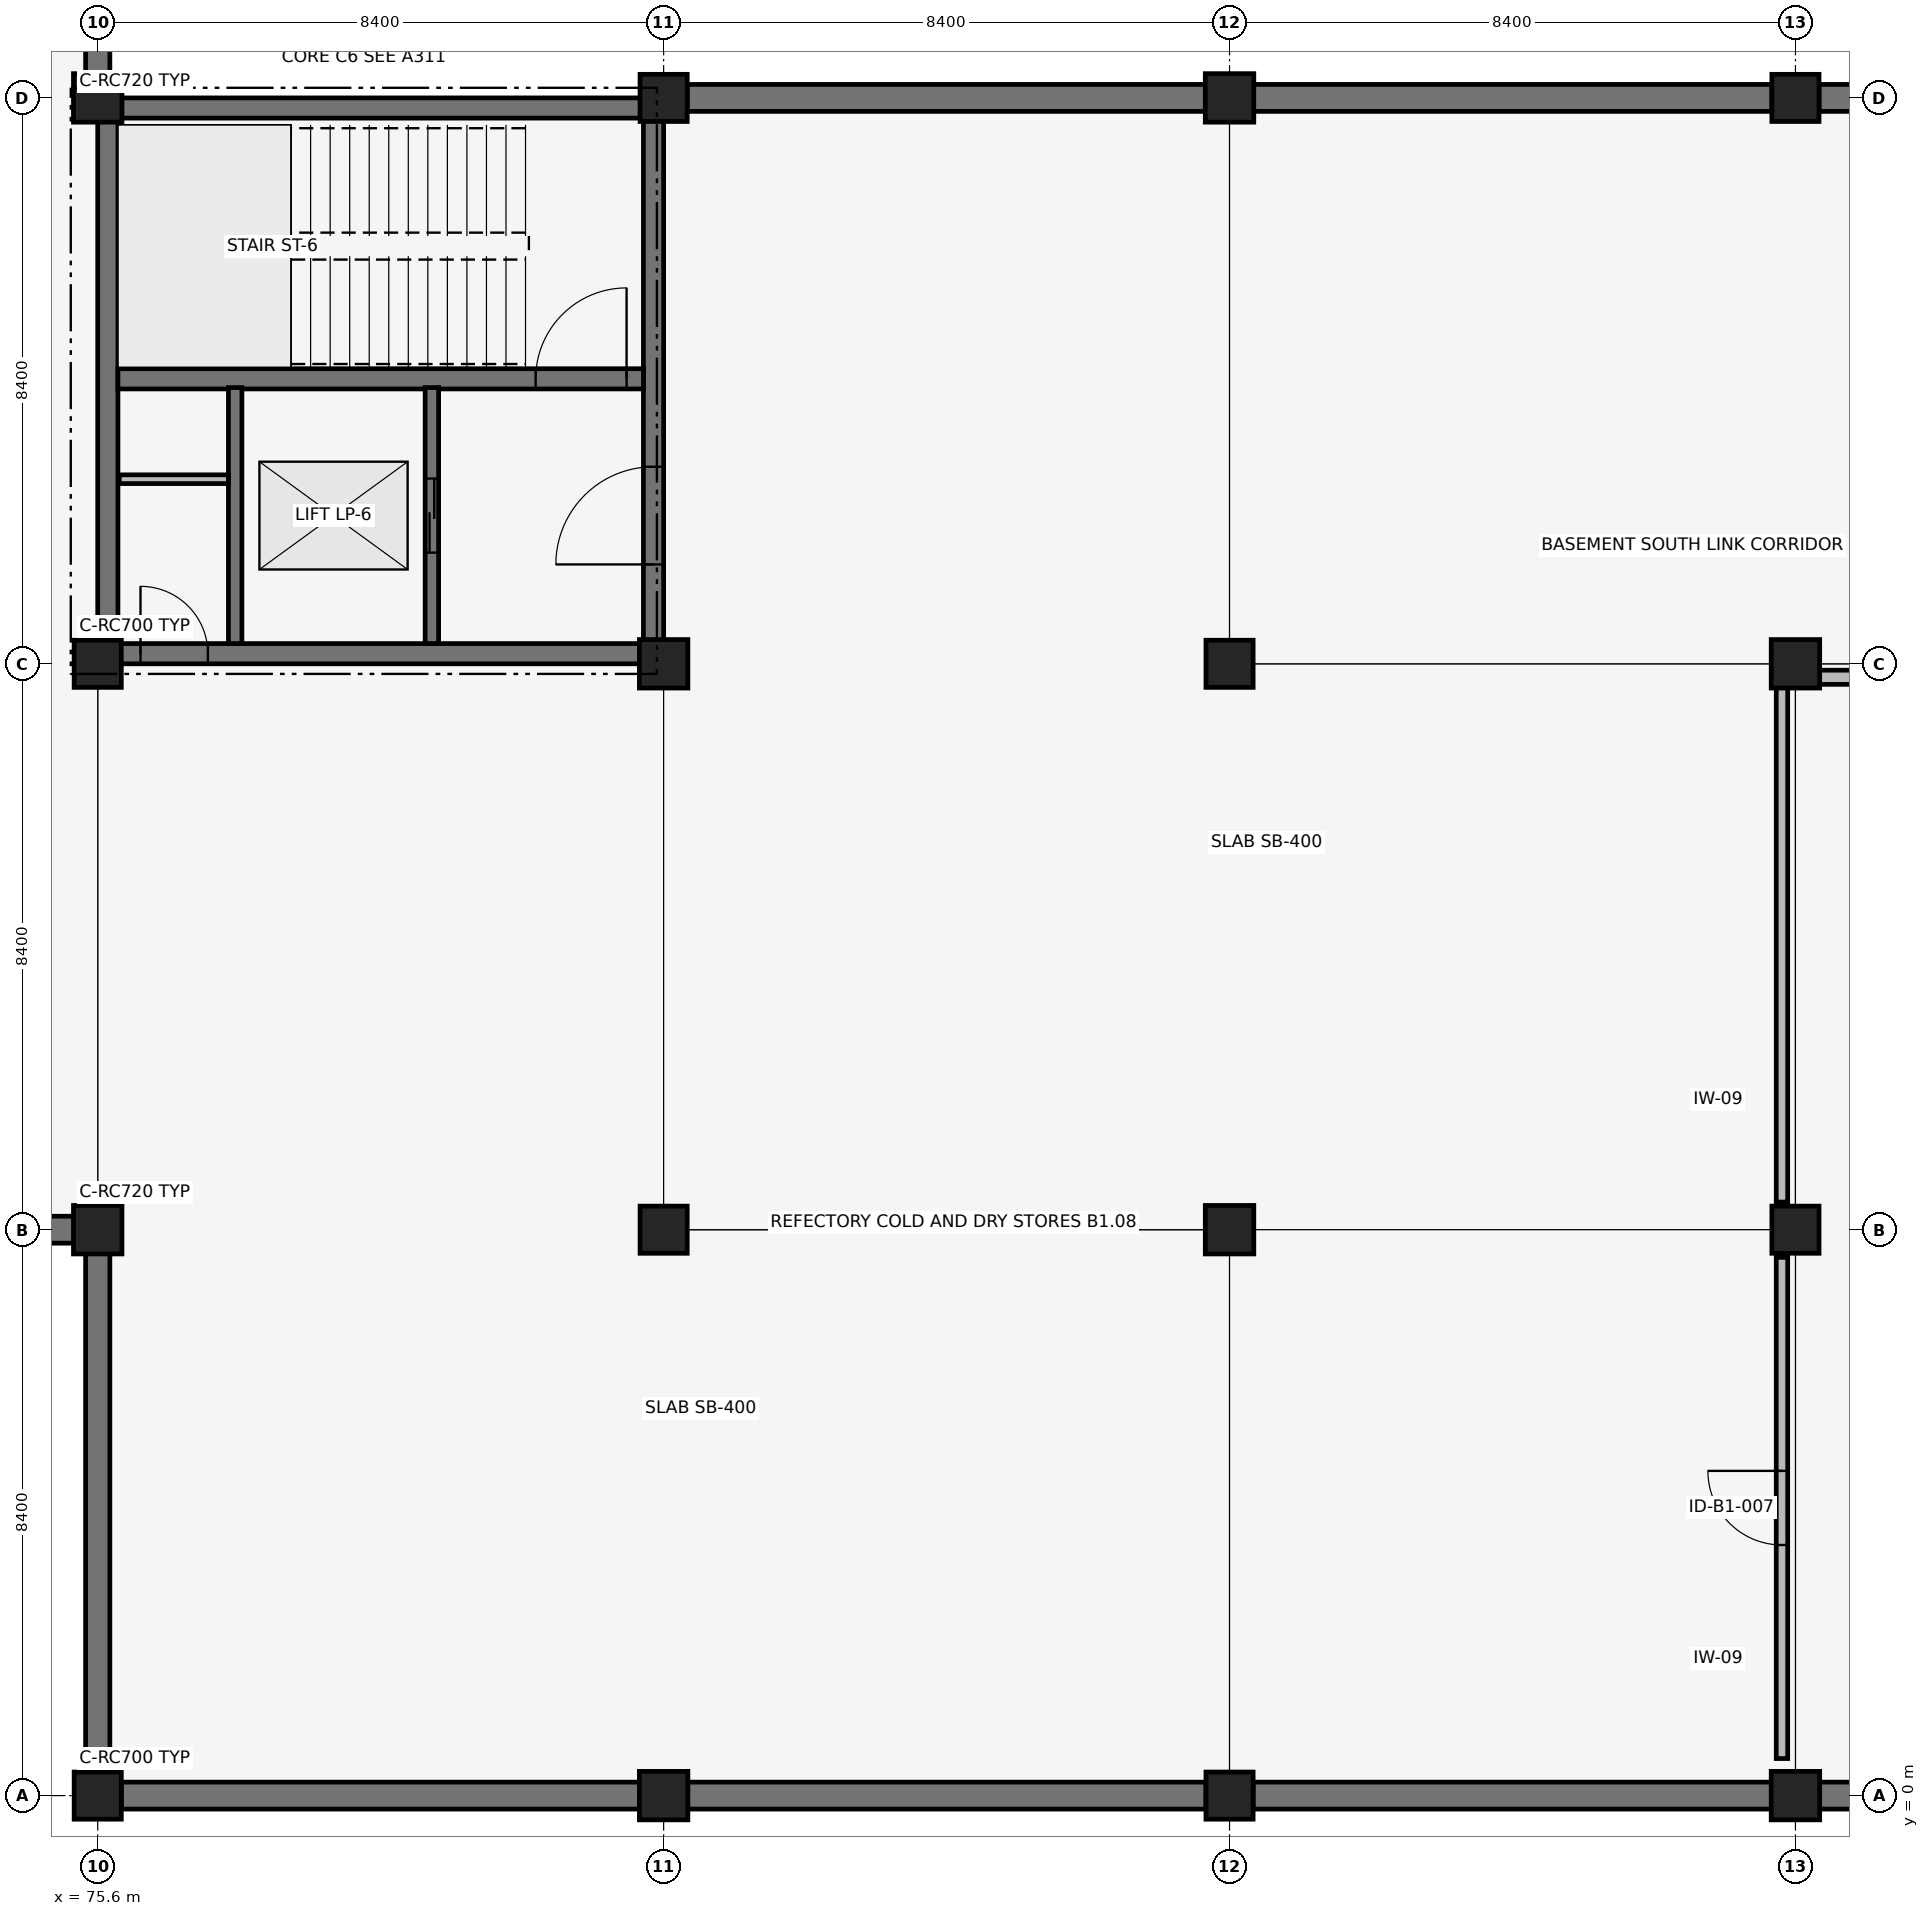
"""IFC4 building model, lengths in metres.
Left out: names, types, materials, properties, quantities, classifications, styles, units other than length and angle.
Written with IfcOpenShell. Run it as: python <this file> out.ifc"""

import sys

from ifc_helpers import new_model, si_unit, direction, frame, frame_2d, origin, origin_2d, place, context, subcontext, project, spatial, rectangle, extrude, element, fill, save


model = new_model("IFC4")
c1 = context("Model", 3, precision=1e-05, world=origin(), true_north=direction((0.0, 1.0)))
c2 = subcontext(c1, "Body", "Model", "MODEL_VIEW")
j1 = project(units=[si_unit("LENGTHUNIT", "METRE"), si_unit("PLANEANGLEUNIT", "RADIAN")], contexts=[c1])
p1 = place(None, origin())
s1 = spatial("IfcSite", under=j1, at=p1, CompositionType="ELEMENT")
p2 = place(p1, origin())
s2 = spatial("IfcBuilding", under=s1, at=p2, CompositionType="ELEMENT")
p3 = place(p2, frame((0.0, 0.0, -4.42)))
s3 = spatial("IfcBuildingStorey", under=s2, at=p3, CompositionType="ELEMENT", Elevation=-4.42)
p4 = place(p3, frame((67.55, 8.4, 0.0), z_axis=(0.0, 0.0, 1.0), x_axis=(1.0, 0.0, 0.0)))
e1 = element("IfcWall", 1, at=p4, inside=s3, PredefinedType="USERDEFINED", context=c2, shape_type="SweptSolid", body=[
    extrude(rectangle(XDim=7.7, YDim=0.4, at=frame_2d((3.85, 0.0))), origin(), (0.0, 0.0, 1.0), 4.12),
])
p5 = place(p3, frame((75.6, 25.55, 0.0), z_axis=(0.0, 0.0, 1.0), x_axis=(0.0, 1.0, 0.0)))
e2 = element("IfcWall", 2, at=p5, inside=s3, PredefinedType="USERDEFINED", context=c2, shape_type="SweptSolid", body=[
    extrude(rectangle(XDim=7.7, YDim=0.36, at=frame_2d((3.85, 0.0))), origin(), (0.0, 0.0, 1.0), 4.12),
])
p6 = place(p3, frame((75.95, 0.0, 0.0), z_axis=(0.0, 0.0, 1.0), x_axis=(1.0, 0.0, 0.0)))
e3 = element("IfcWall", 3, at=p6, inside=s3, PredefinedType="USERDEFINED", context=c2, shape_type="SweptSolid", body=[
    extrude(rectangle(XDim=7.7, YDim=0.4, at=frame_2d((3.85, 0.0))), origin(), (0.0, 0.0, 1.0), 4.12),
])
p7 = place(p3, frame((75.6, 0.35, 0.0), z_axis=(0.0, 0.0, 1.0), x_axis=(0.0, 1.0, 0.0)))
e4 = element("IfcWall", 4, at=p7, inside=s3, PredefinedType="USERDEFINED", context=c2, shape_type="SweptSolid", body=[
    extrude(rectangle(XDim=7.7, YDim=0.36, at=frame_2d((3.85, 0.0))), origin(), (0.0, 0.0, 1.0), 4.12),
])
for number, where, z_axis, x_axis in (
    (5, (84.35, 0.0, 0.0), (0.0, 0.0, 1.0), (1.0, 0.0, 0.0)),
    (6, (84.35, 25.2, 0.0), (0.0, 0.0, 1.0), (1.0, 0.0, 0.0)),
    (7, (92.75, 0.0, 0.0), (0.0, 0.0, 1.0), (1.0, 0.0, 0.0)),
    (8, (92.75, 25.2, 0.0), (0.0, 0.0, 1.0), (1.0, 0.0, 0.0)),
):
    element("IfcWall", number, at=place(p3, frame(where, z_axis=z_axis, x_axis=x_axis)), inside=s3, PredefinedType="USERDEFINED", context=c2, shape_type="SweptSolid", body=[
        extrude(rectangle(XDim=7.7, YDim=0.4, at=frame_2d((3.85, 0.0))), origin(), (0.0, 0.0, 1.0), 4.12),
    ])
for number, where, z_axis, x_axis in (
    (9, (101.15, 0.0, 0.0), (0.0, 0.0, 1.0), (1.0, 0.0, 0.0)),
    (10, (101.15, 25.2, 0.0), (0.0, 0.0, 1.0), (1.0, 0.0, 0.0)),
):
    element("IfcWall", number, at=place(p3, frame(where, z_axis=z_axis, x_axis=x_axis)), inside=s3, PredefinedType="USERDEFINED", context=c2, shape_type="SweptSolid", body=[
        extrude(rectangle(XDim=7.7, YDim=0.4, at=frame_2d((3.85, 0.0))), origin(), (0.0, 0.0, 1.0), 4.12),
    ])
p8 = place(p3, frame((75.75, 16.95, 0.0), z_axis=(0.0, 0.0, 1.0), x_axis=(1.0, 0.0, 0.0)))
e11 = element("IfcWall", 11, at=p8, inside=s3, PredefinedType="SHEAR", context=c2, shape_type="SweptSolid", body=[
    extrude(rectangle(XDim=8.1, YDim=0.3, at=frame_2d((4.05, 0.0))), origin(), (0.0, 0.0, 1.0), 4.12),
])
p9 = place(p8, frame((0.485, 0.0, 0.0)))
e12 = element("IfcOpeningElement", 12, at=p9, cuts=e11, PredefinedType="OPENING", context=c2, shape_type="SweptSolid", body=[
    extrude(rectangle(XDim=1.0, YDim=2.15, at=frame_2d((0.5, 1.075))), frame((0.0, 0.16, 0.0), z_axis=(0.0, -1.0, 0.0), x_axis=(1.0, 0.0, 0.0)), (0.0, 0.0, 1.0), 0.32),
])
for number, where, z_axis, x_axis in (
    (13, (75.75, 25.05, 0.0), (0.0, 0.0, 1.0), (1.0, 0.0, 0.0)),
    (14, (75.75, 16.95, 0.0), (0.0, 0.0, 1.0), (0.0, 1.0, 0.0)),
):
    element("IfcWall", number, at=place(p3, frame(where, z_axis=z_axis, x_axis=x_axis)), inside=s3, PredefinedType="SHEAR", context=c2, shape_type="SweptSolid", body=[
        extrude(rectangle(XDim=8.1, YDim=0.3, at=frame_2d((4.05, 0.0))), origin(), (0.0, 0.0, 1.0), 4.12),
    ])
p10 = place(p3, frame((83.85, 16.95, 0.0), z_axis=(0.0, 0.0, 1.0), x_axis=(0.0, 1.0, 0.0)))
e15 = element("IfcWall", 15, at=p10, inside=s3, PredefinedType="SHEAR", context=c2, shape_type="SweptSolid", body=[
    extrude(rectangle(XDim=8.1, YDim=0.3, at=frame_2d((4.05, 0.0))), origin(), (0.0, 0.0, 1.0), 4.12),
])
p11 = place(p10, frame((1.325, 0.0, 0.0)))
e16 = element("IfcOpeningElement", 16, at=p11, cuts=e15, PredefinedType="OPENING", context=c2, shape_type="SweptSolid", body=[
    extrude(rectangle(XDim=1.45, YDim=2.15, at=frame_2d((0.725, 1.075))), frame((0.0, 0.16, 0.0), z_axis=(0.0, -1.0, 0.0), x_axis=(1.0, 0.0, 0.0)), (0.0, 0.0, 1.0), 0.32),
])
p12 = place(p3, frame((75.9, 21.03, 0.0), z_axis=(0.0, 0.0, 1.0), x_axis=(1.0, 0.0, 0.0)))
e17 = element("IfcWall", 17, at=p12, inside=s3, PredefinedType="SHEAR", context=c2, shape_type="SweptSolid", body=[
    extrude(rectangle(XDim=7.8, YDim=0.3, at=frame_2d((3.9, 0.0))), origin(), (0.0, 0.0, 1.0), 4.12),
])
p13 = place(p12, frame((6.2, 0.0, 0.0)))
e18 = element("IfcOpeningElement", 18, at=p13, cuts=e17, PredefinedType="OPENING", context=c2, shape_type="SweptSolid", body=[
    extrude(rectangle(XDim=1.35, YDim=2.15, at=frame_2d((0.675, 1.075))), frame((0.0, 0.16, 0.0), z_axis=(0.0, -1.0, 0.0), x_axis=(1.0, 0.0, 0.0)), (0.0, 0.0, 1.0), 0.32),
])
p14 = place(p3, frame((75.6, 0.0, -0.4), z_axis=(0.0, 0.0, 1.0), x_axis=(1.0, 0.0, 0.0)))
e19 = element("IfcColumn", 19, at=p14, inside=s3, PredefinedType="COLUMN", context=c2, shape_type="SweptSolid", body=[
    extrude(rectangle(XDim=0.7, YDim=0.7, at=origin_2d()), origin(), (0.0, 0.0, 1.0), 4.52),
])
p15 = place(p3, frame((75.6, 8.4, -0.4), z_axis=(0.0, 0.0, 1.0), x_axis=(1.0, 0.0, 0.0)))
e20 = element("IfcColumn", 20, at=p15, inside=s3, PredefinedType="COLUMN", context=c2, shape_type="SweptSolid", body=[
    extrude(rectangle(XDim=0.72, YDim=0.72, at=origin_2d()), origin(), (0.0, 0.0, 1.0), 4.52),
])
p16 = place(p3, frame((75.6, 16.8, -0.4), z_axis=(0.0, 0.0, 1.0), x_axis=(1.0, 0.0, 0.0)))
e21 = element("IfcColumn", 21, at=p16, inside=s3, PredefinedType="COLUMN", context=c2, shape_type="SweptSolid", body=[
    extrude(rectangle(XDim=0.7, YDim=0.7, at=origin_2d()), origin(), (0.0, 0.0, 1.0), 4.52),
])
for number, where, z_axis, x_axis in (
    (22, (75.6, 25.2, -0.4), (0.0, 0.0, 1.0), (1.0, 0.0, 0.0)),
    (23, (84.0, 0.0, -0.4), (0.0, 0.0, 1.0), (1.0, 0.0, 0.0)),
):
    element("IfcColumn", number, at=place(p3, frame(where, z_axis=z_axis, x_axis=x_axis)), inside=s3, PredefinedType="COLUMN", context=c2, shape_type="SweptSolid", body=[
        extrude(rectangle(XDim=0.72, YDim=0.72, at=origin_2d()), origin(), (0.0, 0.0, 1.0), 4.52),
    ])
p17 = place(p3, frame((84.0, 8.4, -0.4), z_axis=(0.0, 0.0, 1.0), x_axis=(1.0, 0.0, 0.0)))
e24 = element("IfcColumn", 24, at=p17, inside=s3, PredefinedType="COLUMN", context=c2, shape_type="SweptSolid", body=[
    extrude(rectangle(XDim=0.7, YDim=0.7, at=origin_2d()), origin(), (0.0, 0.0, 1.0), 4.52),
])
p18 = place(p3, frame((84.0, 16.8, -0.4), z_axis=(0.0, 0.0, 1.0), x_axis=(1.0, 0.0, 0.0)))
e25 = element("IfcColumn", 25, at=p18, inside=s3, PredefinedType="COLUMN", context=c2, shape_type="SweptSolid", body=[
    extrude(rectangle(XDim=0.72, YDim=0.72, at=origin_2d()), origin(), (0.0, 0.0, 1.0), 4.52),
])
for number, where, z_axis, x_axis in (
    (26, (84.0, 25.2, -0.4), (0.0, 0.0, 1.0), (1.0, 0.0, 0.0)),
    (27, (92.4, 0.0, -0.4), (0.0, 0.0, 1.0), (1.0, 0.0, 0.0)),
):
    element("IfcColumn", number, at=place(p3, frame(where, z_axis=z_axis, x_axis=x_axis)), inside=s3, PredefinedType="COLUMN", context=c2, shape_type="SweptSolid", body=[
        extrude(rectangle(XDim=0.7, YDim=0.7, at=origin_2d()), origin(), (0.0, 0.0, 1.0), 4.52),
    ])
p19 = place(p3, frame((92.4, 8.4, -0.4), z_axis=(0.0, 0.0, 1.0), x_axis=(1.0, 0.0, 0.0)))
e28 = element("IfcColumn", 28, at=p19, inside=s3, PredefinedType="COLUMN", context=c2, shape_type="SweptSolid", body=[
    extrude(rectangle(XDim=0.72, YDim=0.72, at=origin_2d()), origin(), (0.0, 0.0, 1.0), 4.52),
])
p20 = place(p3, frame((92.4, 16.8, -0.4), z_axis=(0.0, 0.0, 1.0), x_axis=(1.0, 0.0, 0.0)))
e29 = element("IfcColumn", 29, at=p20, inside=s3, PredefinedType="COLUMN", context=c2, shape_type="SweptSolid", body=[
    extrude(rectangle(XDim=0.7, YDim=0.7, at=origin_2d()), origin(), (0.0, 0.0, 1.0), 4.52),
])
for number, where, z_axis, x_axis in (
    (30, (92.4, 25.2, -0.4), (0.0, 0.0, 1.0), (1.0, 0.0, 0.0)),
    (31, (100.8, 0.0, -0.4), (0.0, 0.0, 1.0), (1.0, 0.0, 0.0)),
):
    element("IfcColumn", number, at=place(p3, frame(where, z_axis=z_axis, x_axis=x_axis)), inside=s3, PredefinedType="COLUMN", context=c2, shape_type="SweptSolid", body=[
        extrude(rectangle(XDim=0.72, YDim=0.72, at=origin_2d()), origin(), (0.0, 0.0, 1.0), 4.52),
    ])
p21 = place(p3, frame((100.8, 8.4, -0.4), z_axis=(0.0, 0.0, 1.0), x_axis=(1.0, 0.0, 0.0)))
e32 = element("IfcColumn", 32, at=p21, inside=s3, PredefinedType="COLUMN", context=c2, shape_type="SweptSolid", body=[
    extrude(rectangle(XDim=0.7, YDim=0.7, at=origin_2d()), origin(), (0.0, 0.0, 1.0), 4.52),
])
p22 = place(p3, frame((100.8, 16.8, -0.4), z_axis=(0.0, 0.0, 1.0), x_axis=(1.0, 0.0, 0.0)))
e33 = element("IfcColumn", 33, at=p22, inside=s3, PredefinedType="COLUMN", context=c2, shape_type="SweptSolid", body=[
    extrude(rectangle(XDim=0.72, YDim=0.72, at=origin_2d()), origin(), (0.0, 0.0, 1.0), 4.52),
])
p23 = place(p3, frame((100.8, 25.2, -0.4), z_axis=(0.0, 0.0, 1.0), x_axis=(1.0, 0.0, 0.0)))
e34 = element("IfcColumn", 34, at=p23, inside=s3, PredefinedType="COLUMN", context=c2, shape_type="SweptSolid", body=[
    extrude(rectangle(XDim=0.7, YDim=0.7, at=origin_2d()), origin(), (0.0, 0.0, 1.0), 4.52),
])
p24 = place(p3, frame((80.56, 17.1, 0.0), z_axis=(0.0, 0.0, 1.0), x_axis=(0.0, 1.0, 0.0)))
e35 = element("IfcWall", 35, at=p24, inside=s3, PredefinedType="SHEAR", context=c2, shape_type="SweptSolid", body=[
    extrude(rectangle(XDim=3.8, YDim=0.2, at=frame_2d((1.9, 0.0))), origin(), (0.0, 0.0, 1.0), 3.24),
])
p25 = place(p24, frame((1.35, 0.0, 0.0)))
e36 = element("IfcOpeningElement", 36, at=p25, cuts=e35, PredefinedType="OPENING", context=c2, shape_type="SweptSolid", body=[
    extrude(rectangle(XDim=1.1, YDim=2.15, at=frame_2d((0.55, 1.075))), frame((0.0, 0.11, 0.0), z_axis=(0.0, -1.0, 0.0), x_axis=(1.0, 0.0, 0.0)), (0.0, 0.0, 1.0), 0.22),
])
p26 = place(p3, frame((77.64, 17.1, 0.0), z_axis=(0.0, 0.0, 1.0), x_axis=(0.0, 1.0, 0.0)))
e37 = element("IfcWall", 37, at=p26, inside=s3, PredefinedType="SHEAR", context=c2, shape_type="SweptSolid", body=[
    extrude(rectangle(XDim=3.8, YDim=0.2, at=frame_2d((1.9, 0.0))), origin(), (0.0, 0.0, 1.0), 3.24),
])
p27 = place(p3, frame((75.92, 19.54, 0.0), z_axis=(0.0, 0.0, 1.0), x_axis=(1.0, 0.0, 0.0)))
e38 = element("IfcWall", 38, at=p27, inside=s3, PredefinedType="PARTITIONING", context=c2, shape_type="SweptSolid", body=[
    extrude(rectangle(XDim=1.62, YDim=0.13, at=frame_2d((0.81, 0.0))), origin(), (0.0, 0.0, 1.0), 4.12),
])
p28 = place(p3, frame((100.6, 0.55, 0.0), z_axis=(0.0, 0.0, 1.0), x_axis=(0.0, 1.0, 0.0)))
e39 = element("IfcWall", 39, at=p28, inside=s3, PredefinedType="PARTITIONING", context=c2, shape_type="SweptSolid", body=[
    extrude(rectangle(XDim=7.44, YDim=0.17, at=frame_2d((3.72, 0.0))), origin(), (0.0, 0.0, 1.0), 3.32),
])
p29 = place(p28, frame((3.17, 0.0, 0.0)))
e40 = element("IfcOpeningElement", 40, at=p29, cuts=e39, PredefinedType="OPENING", context=c2, shape_type="SweptSolid", body=[
    extrude(rectangle(XDim=1.1, YDim=2.15, at=frame_2d((0.55, 1.075))), frame((0.0, 0.095, 0.0), z_axis=(0.0, -1.0, 0.0), x_axis=(1.0, 0.0, 0.0)), (0.0, 0.0, 1.0), 0.19),
])
p30 = place(p3, frame((100.6, 8.81, 0.0), z_axis=(0.0, 0.0, 1.0), x_axis=(0.0, 1.0, 0.0)))
e41 = element("IfcWall", 41, at=p30, inside=s3, PredefinedType="PARTITIONING", context=c2, shape_type="SweptSolid", body=[
    extrude(rectangle(XDim=7.64, YDim=0.17, at=frame_2d((3.82, 0.0))), origin(), (0.0, 0.0, 1.0), 3.24),
])
p31 = place(p3, frame((101.15, 16.6, 0.0), z_axis=(0.0, 0.0, 1.0), x_axis=(1.0, 0.0, 0.0)))
e42 = element("IfcWall", 42, at=p31, inside=s3, PredefinedType="PARTITIONING", context=c2, shape_type="SweptSolid", body=[
    extrude(rectangle(XDim=7.64, YDim=0.21, at=frame_2d((3.82, 0.0))), origin(), (0.0, 0.0, 1.0), 3.24),
])
p32 = place(p31, frame((3.12, 0.0, 0.0)))
e43 = element("IfcOpeningElement", 43, at=p32, cuts=e42, PredefinedType="OPENING", context=c2, shape_type="SweptSolid", body=[
    extrude(rectangle(XDim=1.4, YDim=2.2, at=frame_2d((0.7, 1.1))), frame((0.0, 0.115, 0.0), z_axis=(0.0, -1.0, 0.0), x_axis=(1.0, 0.0, 0.0)), (0.0, 0.0, 1.0), 0.23),
])
p33 = place(p13, origin())
e44 = element("IfcDoor", 44, at=p33, inside=s3, OperationType="SINGLE_SWING_RIGHT", PredefinedType="DOOR", context=c2, shape_type="SweptSolid", body=[
    extrude(rectangle(XDim=1.35, YDim=2.15, at=frame_2d((0.675, 1.075))), frame((0.0, 0.025, 0.0), z_axis=(0.0, -1.0, 0.0), x_axis=(1.0, 0.0, 0.0)), (0.0, 0.0, 1.0), 0.05),
])
fill(e18, e44)
p34 = place(p25, origin())
e45 = element("IfcDoor", 45, at=p34, inside=s3, OperationType="SLIDING_TO_LEFT", PredefinedType="DOOR", context=c2, shape_type="SweptSolid", body=[
    extrude(rectangle(XDim=1.1, YDim=2.15, at=frame_2d((0.55, 1.075))), frame((0.0, 0.025, 0.0), z_axis=(0.0, -1.0, 0.0), x_axis=(1.0, 0.0, 0.0)), (0.0, 0.0, 1.0), 0.05),
])
fill(e36, e45)
p35 = place(p11, origin())
e46 = element("IfcDoor", 46, at=p35, inside=s3, OperationType="DOUBLE_DOOR_SINGLE_SWING", PredefinedType="DOOR", context=c2, shape_type="SweptSolid", body=[
    extrude(rectangle(XDim=1.45, YDim=2.15, at=frame_2d((0.725, 1.075))), frame((0.0, 0.025, 0.0), z_axis=(0.0, -1.0, 0.0), x_axis=(1.0, 0.0, 0.0)), (0.0, 0.0, 1.0), 0.05),
])
fill(e16, e46)
p36 = place(p9, origin())
e47 = element("IfcDoor", 47, at=p36, inside=s3, OperationType="SINGLE_SWING_LEFT", PredefinedType="DOOR", context=c2, shape_type="SweptSolid", body=[
    extrude(rectangle(XDim=1.0, YDim=2.15, at=frame_2d((0.5, 1.075))), frame((0.0, 0.025, 0.0), z_axis=(0.0, -1.0, 0.0), x_axis=(1.0, 0.0, 0.0)), (0.0, 0.0, 1.0), 0.05),
])
fill(e12, e47)
p37 = place(p29, origin())
e48 = element("IfcDoor", 48, at=p37, inside=s3, OperationType="SINGLE_SWING_RIGHT", PredefinedType="DOOR", context=c2, shape_type="SweptSolid", body=[
    extrude(rectangle(XDim=1.1, YDim=2.15, at=frame_2d((0.55, 1.075))), frame((0.0, 0.025, 0.0), z_axis=(0.0, -1.0, 0.0), x_axis=(1.0, 0.0, 0.0)), (0.0, 0.0, 1.0), 0.05),
])
fill(e40, e48)
save(model, sys.argv[1])
